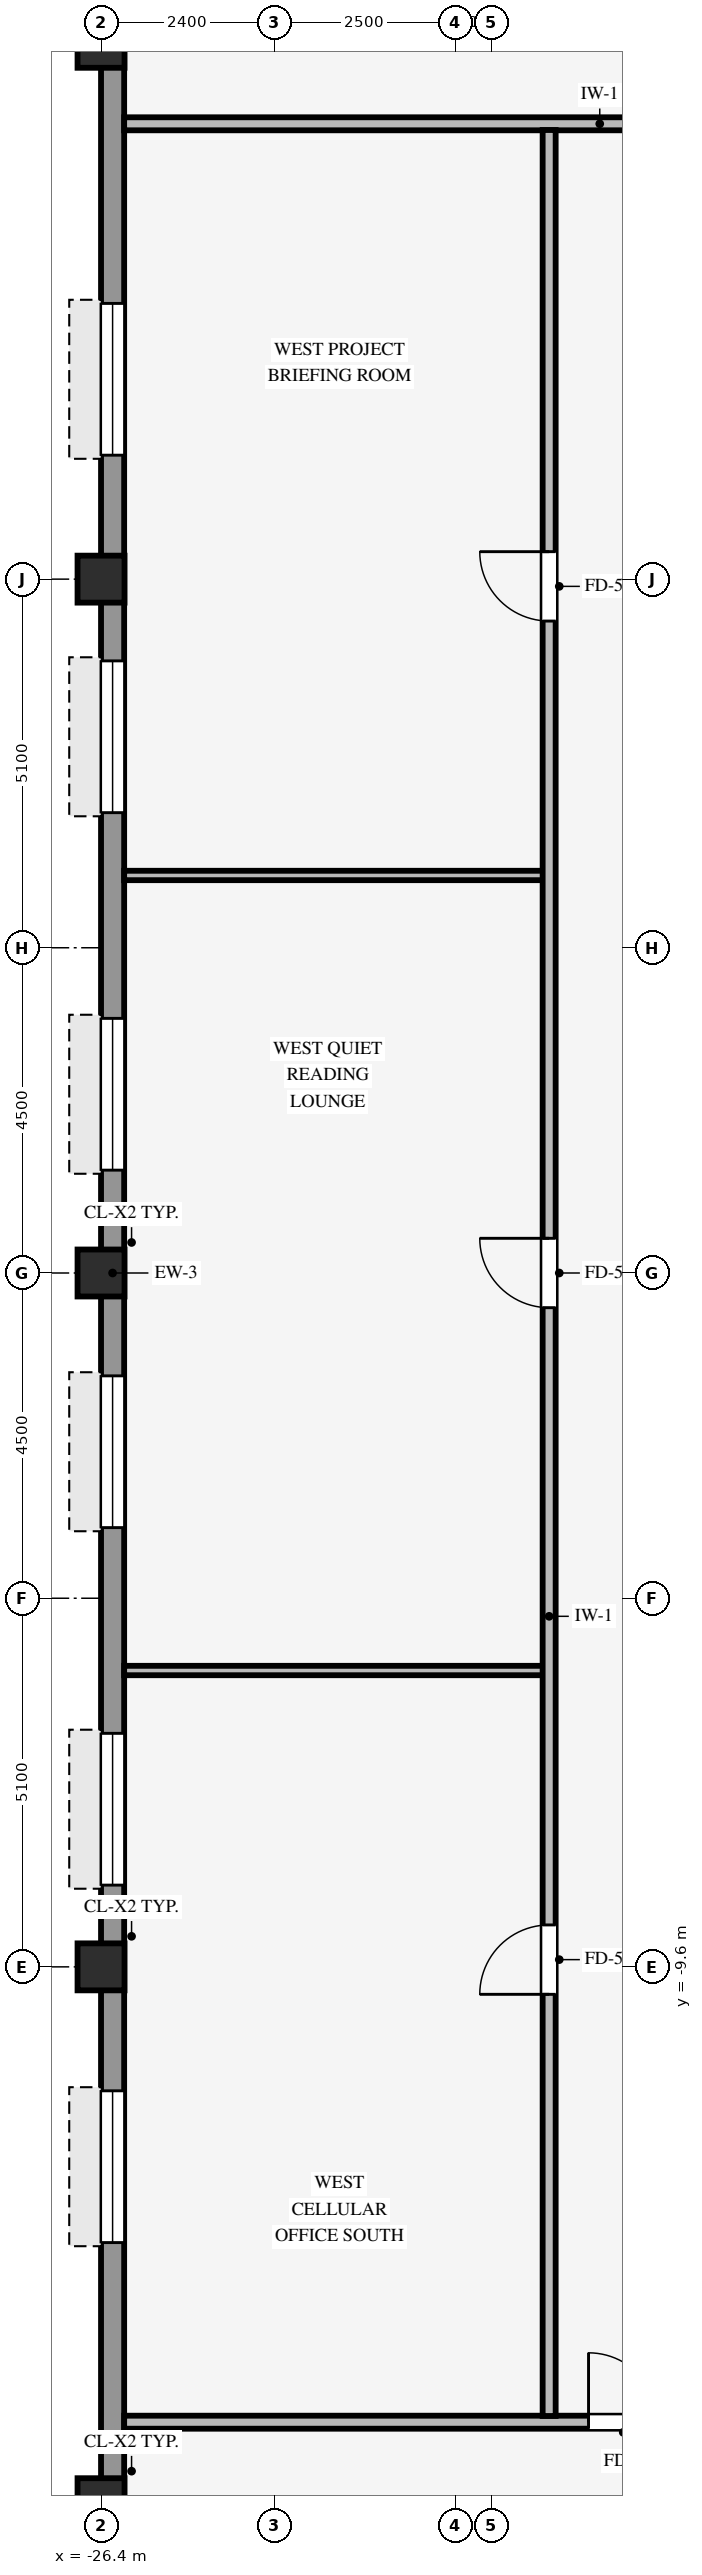
"""IFC4 building model, lengths in metres.
Left out: names, types, materials, properties, quantities, classifications, styles, units other than length and angle.
Written with IfcOpenShell. Run it as: python <this file> out.ifc"""

import sys

from ifc_helpers import new_model, si_unit, direction, frame, frame_2d, origin, origin_2d, place, context, subcontext, project, spatial, rectangle, hollow_rectangle, extrude, source, transform, mapped, element, fill, save


model = new_model("IFC4")
c1 = context("Model", 3, precision=1e-05, world=origin(), true_north=direction((0.0, 1.0)))
c2 = subcontext(c1, "Body", "Model", "MODEL_VIEW")
j1 = project(units=[si_unit("LENGTHUNIT", "METRE"), si_unit("PLANEANGLEUNIT", "RADIAN")], contexts=[c1])
p1 = place(None, origin())
s1 = spatial("IfcSite", under=j1, at=p1, CompositionType="ELEMENT")
p2 = place(p1, origin())
s2 = spatial("IfcBuilding", under=s1, at=p2, CompositionType="ELEMENT")
p3 = place(p2, frame((0.0, 0.0, 156.7)))
s3 = spatial("IfcBuildingStorey", under=s2, at=p3, CompositionType="ELEMENT", Elevation=156.7)
for number, where, z_axis, x_axis in (
    (1, (-26.4, -17.0, 0.0), (0.0, 0.0, 1.0), (1.0, 0.0, 0.0)),
    (2, (-26.4, -9.6, 0.0), (0.0, 0.0, 1.0), (1.0, 0.0, 0.0)),
    (3, (-26.4, 0.0, 0.0), (0.0, 0.0, 1.0), (1.0, 0.0, 0.0)),
    (4, (-26.4, 9.6, 0.0), (0.0, 0.0, 1.0), (1.0, 0.0, 0.0)),
    (5, (-26.4, 17.0, 0.0), (0.0, 0.0, 1.0), (1.0, 0.0, 0.0)),
):
    element("IfcColumn", number, at=place(p3, frame(where, z_axis=z_axis, x_axis=x_axis)), inside=s3, PredefinedType="COLUMN", context=c2, shape_type="SweptSolid", body=[
        extrude(hollow_rectangle(XDim=0.65, YDim=0.65, WallThickness=0.04, InnerFilletRadius=0.04, OuterFilletRadius=0.08, at=origin_2d()), origin(), (0.0, 0.0, 1.0), 3.37),
    ])
p4 = place(p3, frame((-26.24, -20.784, 0.0), z_axis=(0.0, 0.0, 1.0), x_axis=(0.0, 1.0, 0.0)))
e6 = element("IfcWall", 6, at=p4, inside=s3, PredefinedType="STANDARD", context=c2, shape_type="SweptSolid", body=[
    extrude(rectangle(XDim=41.568, YDim=0.32, at=frame_2d((20.784, 0.0))), origin(), (0.0, 0.0, 1.0), 2.705),
])
p5 = place(p4, frame((7.369, 0.0, 0.8)))
e7 = element("IfcOpeningElement", 7, at=p5, cuts=e6, PredefinedType="OPENING", context=c2, shape_type="SweptSolid", body=[
    extrude(rectangle(XDim=2.1, YDim=1.56, at=frame_2d((1.05, 0.78))), frame((0.0, 0.17, 0.0), z_axis=(0.0, -1.0, 0.0), x_axis=(1.0, 0.0, 0.0)), (0.0, 0.0, 1.0), 0.34),
])
p6 = place(p4, frame((12.315, 0.0, 0.8)))
e8 = element("IfcOpeningElement", 8, at=p6, cuts=e6, PredefinedType="OPENING", context=c2, shape_type="SweptSolid", body=[
    extrude(rectangle(XDim=2.1, YDim=1.56, at=frame_2d((1.05, 0.78))), frame((0.0, 0.17, 0.0), z_axis=(0.0, -1.0, 0.0), x_axis=(1.0, 0.0, 0.0)), (0.0, 0.0, 1.0), 0.34),
])
p7 = place(p4, frame((17.261, 0.0, 0.8)))
e9 = element("IfcOpeningElement", 9, at=p7, cuts=e6, PredefinedType="OPENING", context=c2, shape_type="SweptSolid", body=[
    extrude(rectangle(XDim=2.1, YDim=1.56, at=frame_2d((1.05, 0.78))), frame((0.0, 0.17, 0.0), z_axis=(0.0, -1.0, 0.0), x_axis=(1.0, 0.0, 0.0)), (0.0, 0.0, 1.0), 0.34),
])
p8 = place(p4, frame((22.207, 0.0, 0.8)))
e10 = element("IfcOpeningElement", 10, at=p8, cuts=e6, PredefinedType="OPENING", context=c2, shape_type="SweptSolid", body=[
    extrude(rectangle(XDim=2.1, YDim=1.56, at=frame_2d((1.05, 0.78))), frame((0.0, 0.17, 0.0), z_axis=(0.0, -1.0, 0.0), x_axis=(1.0, 0.0, 0.0)), (0.0, 0.0, 1.0), 0.34),
])
p9 = place(p4, frame((27.153, 0.0, 0.8)))
e11 = element("IfcOpeningElement", 11, at=p9, cuts=e6, PredefinedType="OPENING", context=c2, shape_type="SweptSolid", body=[
    extrude(rectangle(XDim=2.1, YDim=1.56, at=frame_2d((1.05, 0.78))), frame((0.0, 0.17, 0.0), z_axis=(0.0, -1.0, 0.0), x_axis=(1.0, 0.0, 0.0)), (0.0, 0.0, 1.0), 0.34),
])
p10 = place(p4, frame((32.099, 0.0, 0.8)))
e12 = element("IfcOpeningElement", 12, at=p10, cuts=e6, PredefinedType="OPENING", context=c2, shape_type="SweptSolid", body=[
    extrude(rectangle(XDim=2.1, YDim=1.56, at=frame_2d((1.05, 0.78))), frame((0.0, 0.17, 0.0), z_axis=(0.0, -1.0, 0.0), x_axis=(1.0, 0.0, 0.0)), (0.0, 0.0, 1.0), 0.34),
])
p11 = place(p3, frame((-26.08, -15.9, 0.0), z_axis=(0.0, 0.0, 1.0), x_axis=(1.0, 0.0, 0.0)))
e13 = element("IfcWall", 13, at=p11, inside=s3, PredefinedType="PARTITIONING", context=c2, shape_type="SweptSolid", body=[
    extrude(rectangle(XDim=52.16, YDim=0.18, at=frame_2d((26.08, 0.0))), origin(), (0.0, 0.0, 1.0), 3.36),
])
p12 = place(p11, frame((24.5, 0.0, 0.0)))
e14 = element("IfcOpeningElement", 14, at=p12, cuts=e13, PredefinedType="OPENING", context=c2, shape_type="SweptSolid", body=[
    extrude(rectangle(XDim=0.96, YDim=2.1, at=frame_2d((0.48, 1.05))), frame((0.0, 0.1, 0.0), z_axis=(0.0, -1.0, 0.0), x_axis=(1.0, 0.0, 0.0)), (0.0, 0.0, 1.0), 0.2),
])
p13 = place(p11, frame((40.5, 0.0, 0.0)))
e15 = element("IfcOpeningElement", 15, at=p13, cuts=e13, PredefinedType="OPENING", context=c2, shape_type="SweptSolid", body=[
    extrude(rectangle(XDim=0.96, YDim=2.1, at=frame_2d((0.48, 1.05))), frame((0.0, 0.1, 0.0), z_axis=(0.0, -1.0, 0.0), x_axis=(1.0, 0.0, 0.0)), (0.0, 0.0, 1.0), 0.2),
])
p14 = place(p11, frame((13.16, 0.0, 0.0)))
e16 = element("IfcOpeningElement", 16, at=p14, cuts=e13, PredefinedType="OPENING", context=c2, shape_type="SweptSolid", body=[
    extrude(rectangle(XDim=0.96, YDim=2.1, at=frame_2d((0.48, 1.05))), frame((0.0, 0.1, 0.0), z_axis=(0.0, -1.0, 0.0), x_axis=(1.0, 0.0, 0.0)), (0.0, 0.0, 1.0), 0.2),
])
p15 = place(p11, frame((6.425, 0.0, 0.0)))
e17 = element("IfcOpeningElement", 17, at=p15, cuts=e13, PredefinedType="OPENING", context=c2, shape_type="SweptSolid", body=[
    extrude(rectangle(XDim=0.96, YDim=2.1, at=frame_2d((0.48, 1.05))), frame((0.0, 0.1, 0.0), z_axis=(0.0, -1.0, 0.0), x_axis=(1.0, 0.0, 0.0)), (0.0, 0.0, 1.0), 0.2),
])
for number, where, z_axis, x_axis in (
    (18, (-26.08, -5.5, 0.0), (0.0, 0.0, 1.0), (1.0, 0.0, 0.0)),
    (19, (-26.08, 5.5, 0.0), (0.0, 0.0, 1.0), (1.0, 0.0, 0.0)),
):
    element("IfcWall", number, at=place(p3, frame(where, z_axis=z_axis, x_axis=x_axis)), inside=s3, PredefinedType="PARTITIONING", context=c2, shape_type="SweptSolid", body=[
        extrude(rectangle(XDim=5.794, YDim=0.13, at=frame_2d((2.897, 0.0))), origin(), (0.0, 0.0, 1.0), 3.36),
    ])
p16 = place(p3, frame((-26.08, 15.9, 0.0), z_axis=(0.0, 0.0, 1.0), x_axis=(1.0, 0.0, 0.0)))
e20 = element("IfcWall", 20, at=p16, inside=s3, PredefinedType="PARTITIONING", context=c2, shape_type="SweptSolid", body=[
    extrude(rectangle(XDim=52.16, YDim=0.18, at=frame_2d((26.08, 0.0))), origin(), (0.0, 0.0, 1.0), 3.36),
])
p17 = place(p16, frame((26.72, 0.0, 0.0)))
e21 = element("IfcOpeningElement", 21, at=p17, cuts=e20, PredefinedType="OPENING", context=c2, shape_type="SweptSolid", body=[
    extrude(rectangle(XDim=0.96, YDim=2.1, at=frame_2d((0.48, 1.05))), frame((0.0, 0.1, 0.0), z_axis=(0.0, -1.0, 0.0), x_axis=(1.0, 0.0, 0.0)), (0.0, 0.0, 1.0), 0.2),
])
p18 = place(p16, frame((40.5, 0.0, 0.0)))
e22 = element("IfcOpeningElement", 22, at=p18, cuts=e20, PredefinedType="OPENING", context=c2, shape_type="SweptSolid", body=[
    extrude(rectangle(XDim=0.96, YDim=2.1, at=frame_2d((0.48, 1.05))), frame((0.0, 0.1, 0.0), z_axis=(0.0, -1.0, 0.0), x_axis=(1.0, 0.0, 0.0)), (0.0, 0.0, 1.0), 0.2),
])
p19 = place(p16, frame((13.61, 0.0, 0.0)))
e23 = element("IfcOpeningElement", 23, at=p19, cuts=e20, PredefinedType="OPENING", context=c2, shape_type="SweptSolid", body=[
    extrude(rectangle(XDim=0.96, YDim=2.1, at=frame_2d((0.48, 1.05))), frame((0.0, 0.1, 0.0), z_axis=(0.0, -1.0, 0.0), x_axis=(1.0, 0.0, 0.0)), (0.0, 0.0, 1.0), 0.2),
])
p20 = place(p3, frame((-20.2, -15.814, 0.0), z_axis=(0.0, 0.0, 1.0), x_axis=(0.0, 1.0, 0.0)))
e24 = element("IfcWall", 24, at=p20, inside=s3, PredefinedType="PARTITIONING", context=c2, shape_type="SweptSolid", body=[
    extrude(rectangle(XDim=31.628, YDim=0.18, at=frame_2d((15.814, 0.0))), origin(), (0.0, 0.0, 1.0), 3.36),
])
p21 = place(p20, frame((15.334, 0.0, 0.0)))
e25 = element("IfcOpeningElement", 25, at=p21, cuts=e24, PredefinedType="OPENING", context=c2, shape_type="SweptSolid", body=[
    extrude(rectangle(XDim=0.96, YDim=2.1, at=frame_2d((0.48, 1.05))), frame((0.0, 0.1, 0.0), z_axis=(0.0, -1.0, 0.0), x_axis=(1.0, 0.0, 0.0)), (0.0, 0.0, 1.0), 0.2),
])
p22 = place(p20, frame((5.834, 0.0, 0.0)))
e26 = element("IfcOpeningElement", 26, at=p22, cuts=e24, PredefinedType="OPENING", context=c2, shape_type="SweptSolid", body=[
    extrude(rectangle(XDim=0.96, YDim=2.1, at=frame_2d((0.48, 1.05))), frame((0.0, 0.1, 0.0), z_axis=(0.0, -1.0, 0.0), x_axis=(1.0, 0.0, 0.0)), (0.0, 0.0, 1.0), 0.2),
])
p23 = place(p20, frame((24.834, 0.0, 0.0)))
e27 = element("IfcOpeningElement", 27, at=p23, cuts=e24, PredefinedType="OPENING", context=c2, shape_type="SweptSolid", body=[
    extrude(rectangle(XDim=0.96, YDim=2.1, at=frame_2d((0.48, 1.05))), frame((0.0, 0.1, 0.0), z_axis=(0.0, -1.0, 0.0), x_axis=(1.0, 0.0, 0.0)), (0.0, 0.0, 1.0), 0.2),
])
m1 = source(origin(), c2, "Body", "SweptSolid", [
    extrude(rectangle(XDim=2.1, YDim=1.56, at=frame_2d((1.05, 0.78))), frame((0.0, 0.03, 0.0), z_axis=(0.0, -1.0, 0.0), x_axis=(1.0, 0.0, 0.0)), (0.0, 0.0, 1.0), 0.06),
])
p24 = place(p5, origin())
e28 = element("IfcWindow", 28, at=p24, inside=s3, PartitioningType="SINGLE_PANEL", PredefinedType="WINDOW", context=c2, shape_type="MappedRepresentation", body=[
    mapped(m1, transform((0.0, 0.0, 0.0), scale=1.0)),
])
fill(e7, e28)
p25 = place(p6, origin())
e29 = element("IfcWindow", 29, at=p25, inside=s3, PartitioningType="SINGLE_PANEL", PredefinedType="WINDOW", context=c2, shape_type="MappedRepresentation", body=[
    mapped(m1, transform((0.0, 0.0, 0.0), scale=1.0)),
])
fill(e8, e29)
p26 = place(p7, origin())
e30 = element("IfcWindow", 30, at=p26, inside=s3, PartitioningType="SINGLE_PANEL", PredefinedType="WINDOW", context=c2, shape_type="MappedRepresentation", body=[
    mapped(m1, transform((0.0, 0.0, 0.0), scale=1.0)),
])
fill(e9, e30)
p27 = place(p8, origin())
e31 = element("IfcWindow", 31, at=p27, inside=s3, PartitioningType="SINGLE_PANEL", PredefinedType="WINDOW", context=c2, shape_type="MappedRepresentation", body=[
    mapped(m1, transform((0.0, 0.0, 0.0), scale=1.0)),
])
fill(e10, e31)
p28 = place(p9, origin())
e32 = element("IfcWindow", 32, at=p28, inside=s3, PartitioningType="SINGLE_PANEL", PredefinedType="WINDOW", context=c2, shape_type="MappedRepresentation", body=[
    mapped(m1, transform((0.0, 0.0, 0.0), scale=1.0)),
])
fill(e11, e32)
p29 = place(p10, origin())
e33 = element("IfcWindow", 33, at=p29, inside=s3, PartitioningType="SINGLE_PANEL", PredefinedType="WINDOW", context=c2, shape_type="MappedRepresentation", body=[
    mapped(m1, transform((0.0, 0.0, 0.0), scale=1.0)),
])
fill(e12, e33)
m2 = source(origin(), c2, "Body", "SweptSolid", [
    extrude(rectangle(XDim=0.96, YDim=2.1, at=frame_2d((0.48, 1.05))), frame((0.0, 0.025, 0.0), z_axis=(0.0, -1.0, 0.0), x_axis=(1.0, 0.0, 0.0)), (0.0, 0.0, 1.0), 0.05),
])
p30 = place(p21, origin())
e34 = element("IfcDoor", 34, at=p30, inside=s3, OperationType="SINGLE_SWING_RIGHT", PredefinedType="DOOR", context=c2, shape_type="MappedRepresentation", body=[
    mapped(m2, transform((0.0, 0.0, 0.0), scale=1.0)),
])
fill(e25, e34)
p31 = place(p22, origin())
e35 = element("IfcDoor", 35, at=p31, inside=s3, OperationType="SINGLE_SWING_LEFT", PredefinedType="DOOR", context=c2, shape_type="MappedRepresentation", body=[
    mapped(m2, transform((0.0, 0.0, 0.0), scale=1.0)),
])
fill(e26, e35)
p32 = place(p23, origin())
e36 = element("IfcDoor", 36, at=p32, inside=s3, OperationType="SINGLE_SWING_RIGHT", PredefinedType="DOOR", context=c2, shape_type="MappedRepresentation", body=[
    mapped(m2, transform((0.0, 0.0, 0.0), scale=1.0)),
])
fill(e27, e36)
p33 = place(p15, origin())
e37 = element("IfcDoor", 37, at=p33, inside=s3, OperationType="SINGLE_SWING_LEFT", PredefinedType="DOOR", context=c2, shape_type="MappedRepresentation", body=[
    mapped(m2, transform((0.0, 0.0, 0.0), scale=1.0)),
])
fill(e17, e37)
save(model, sys.argv[1])
